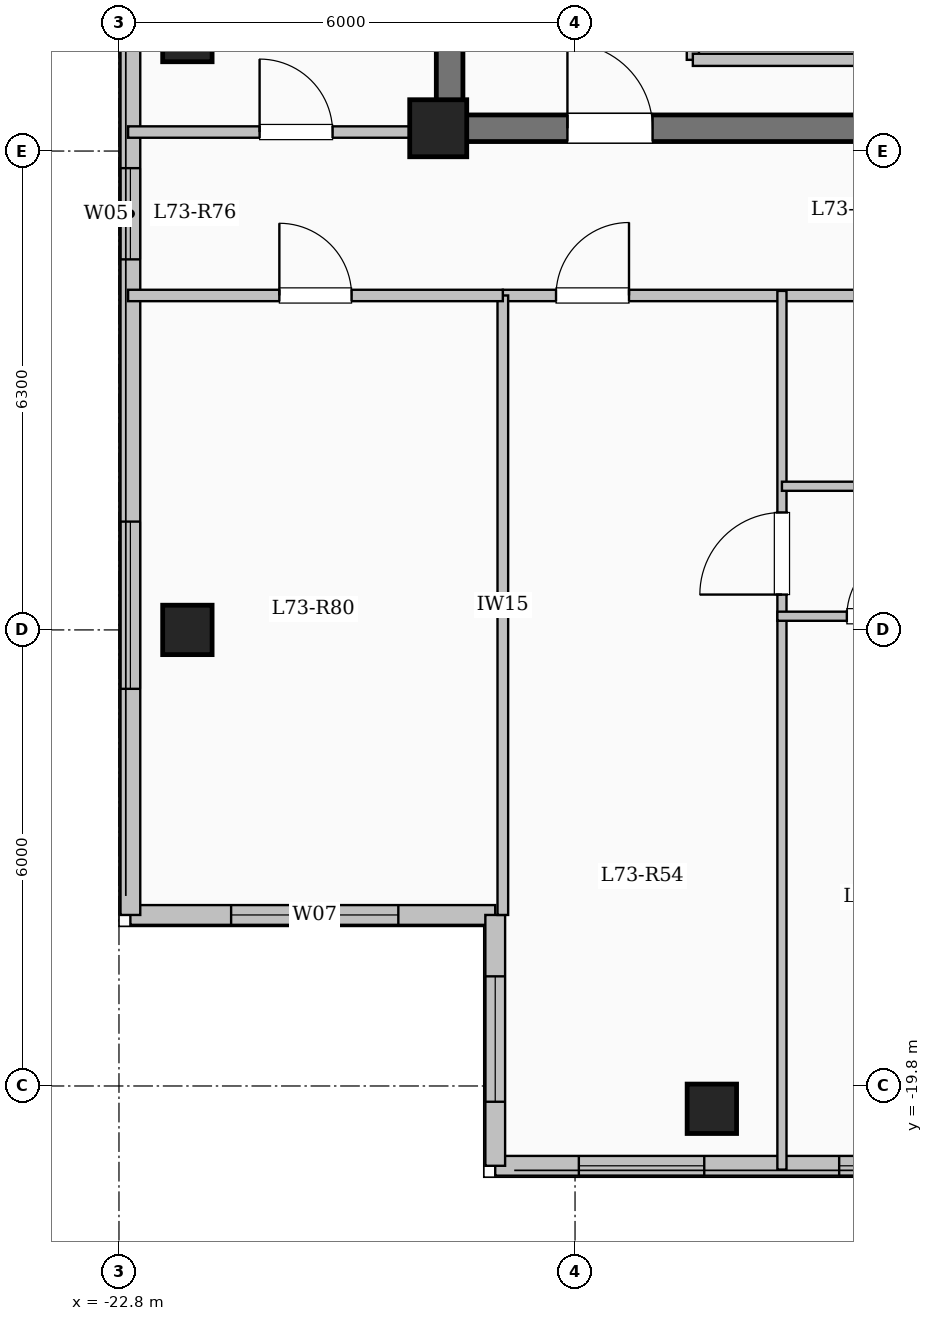
"""IFC4 building model, lengths in metres.
Left out: names, types, materials, properties, quantities, classifications, styles, units other than length and angle.
Written with IfcOpenShell. Run it as: python <this file> out.ifc"""

import sys

from ifc_helpers import new_model, si_unit, direction, frame, frame_2d, origin, origin_2d, place, context, subcontext, project, spatial, rectangle, extrude, element, fill, save


model = new_model("IFC4")
c1 = context("Model", 3, precision=1e-05, world=origin(), true_north=direction((0.0, 1.0)))
c2 = subcontext(c1, "Body", "Model", "MODEL_VIEW")
j1 = project(units=[si_unit("LENGTHUNIT", "METRE"), si_unit("PLANEANGLEUNIT", "RADIAN")], contexts=[c1])
p1 = place(None, origin())
s1 = spatial("IfcSite", under=j1, at=p1, CompositionType="ELEMENT")
p2 = place(p1, origin())
s2 = spatial("IfcBuilding", under=s1, at=p2, CompositionType="ELEMENT")
p3 = place(p2, frame((0.0, 0.0, 268.3)))
s3 = spatial("IfcBuildingStorey", under=s2, at=p3, CompositionType="ELEMENT", Elevation=268.3)
p4 = place(p3, frame((-18.6, -7.2, 0.0), z_axis=(0.0, 0.0, 1.0), x_axis=(1.0, 0.0, 0.0)))
e1 = element("IfcColumn", 1, at=p4, inside=s3, PredefinedType="COLUMN", context=c2, shape_type="SweptSolid", body=[
    extrude(rectangle(XDim=0.75, YDim=0.75, at=origin_2d()), origin(), (0.0, 0.0, 1.0), 3.35),
])
for number, where, z_axis, x_axis in (
    (2, (-15.0, -20.1, 0.0), (0.0, 0.0, 1.0), (1.0, 0.0, 0.0)),
    (3, (-21.9, -13.8, 0.0), (0.0, 0.0, 1.0), (1.0, 0.0, 0.0)),
    (4, (-21.9, -6.0, 0.0), (0.0, 0.0, 1.0), (1.0, 0.0, 0.0)),
):
    element("IfcColumn", number, at=place(p3, frame(where, z_axis=z_axis, x_axis=x_axis)), inside=s3, PredefinedType="COLUMN", context=c2, shape_type="SweptSolid", body=[
        extrude(rectangle(XDim=0.65, YDim=0.65, at=origin_2d()), origin(), (0.0, 0.0, 1.0), 3.35),
    ])
p5 = place(p3, frame((-17.85, -17.55, 0.0), z_axis=(0.0, 0.0, 1.0), x_axis=(-1.0, 0.0, 0.0)))
e5 = element("IfcWall", 5, at=p5, inside=s3, PredefinedType="SOLIDWALL", context=c2, shape_type="SweptSolid", body=[
    extrude(rectangle(XDim=4.8, YDim=0.26, at=frame_2d((2.4, 0.0))), origin(), (0.0, 0.0, 1.0), 3.05),
])
p6 = place(p5, frame((1.275, 0.0, 0.9)))
e6 = element("IfcOpeningElement", 6, at=p6, cuts=e5, PredefinedType="OPENING", context=c2, shape_type="SweptSolid", body=[
    extrude(rectangle(XDim=2.2, YDim=1.75, at=frame_2d((1.1, 0.875))), frame((0.0, 0.14, 0.0), z_axis=(0.0, -1.0, 0.0), x_axis=(1.0, 0.0, 0.0)), (0.0, 0.0, 1.0), 0.28),
])
p7 = place(p3, frame((-22.65, -17.55, 0.0), z_axis=(0.0, 0.0, 1.0), x_axis=(0.0, 1.0, 0.0)))
e7 = element("IfcWall", 7, at=p7, inside=s3, PredefinedType="SOLIDWALL", context=c2, shape_type="SweptSolid", body=[
    extrude(rectangle(XDim=35.1, YDim=0.26, at=frame_2d((17.55, 0.0))), origin(), (0.0, 0.0, 1.0), 3.05),
])
p8 = place(p7, frame((2.975, 0.0, 0.9)))
e8 = element("IfcOpeningElement", 8, at=p8, cuts=e7, PredefinedType="OPENING", context=c2, shape_type="SweptSolid", body=[
    extrude(rectangle(XDim=2.2, YDim=1.75, at=frame_2d((1.1, 0.875))), frame((0.0, 0.14, 0.0), z_axis=(0.0, -1.0, 0.0), x_axis=(1.0, 0.0, 0.0)), (0.0, 0.0, 1.0), 0.28),
])
p9 = place(p7, frame((8.625, 0.0, 0.95)))
e9 = element("IfcOpeningElement", 9, at=p9, cuts=e7, PredefinedType="OPENING", context=c2, shape_type="SweptSolid", body=[
    extrude(rectangle(XDim=1.2, YDim=1.5, at=frame_2d((0.6, 0.75))), frame((0.0, 0.14, 0.0), z_axis=(0.0, -1.0, 0.0), x_axis=(1.0, 0.0, 0.0)), (0.0, 0.0, 1.0), 0.28),
])
p10 = place(p7, frame((13.55, 0.0, 0.9)))
e10 = element("IfcOpeningElement", 10, at=p10, cuts=e7, PredefinedType="OPENING", context=c2, shape_type="SweptSolid", body=[
    extrude(rectangle(XDim=2.2, YDim=1.75, at=frame_2d((1.1, 0.875))), frame((0.0, 0.14, 0.0), z_axis=(0.0, -1.0, 0.0), x_axis=(1.0, 0.0, 0.0)), (0.0, 0.0, 1.0), 0.28),
])
p11 = place(p7, frame((19.95, 0.0, 0.9)))
e11 = element("IfcOpeningElement", 11, at=p11, cuts=e7, PredefinedType="OPENING", context=c2, shape_type="SweptSolid", body=[
    extrude(rectangle(XDim=1.65, YDim=1.6, at=frame_2d((0.825, 0.8))), frame((0.0, 0.14, 0.0), z_axis=(0.0, -1.0, 0.0), x_axis=(1.0, 0.0, 0.0)), (0.0, 0.0, 1.0), 0.28),
])
p12 = place(p7, frame((24.425, 0.0, 0.9)))
e12 = element("IfcOpeningElement", 12, at=p12, cuts=e7, PredefinedType="OPENING", context=c2, shape_type="SweptSolid", body=[
    extrude(rectangle(XDim=2.0, YDim=1.7, at=frame_2d((1.0, 0.85))), frame((0.0, 0.14, 0.0), z_axis=(0.0, -1.0, 0.0), x_axis=(1.0, 0.0, 0.0)), (0.0, 0.0, 1.0), 0.28),
])
p13 = place(p7, frame((28.675, 0.0, 0.95)))
e13 = element("IfcOpeningElement", 13, at=p13, cuts=e7, PredefinedType="OPENING", context=c2, shape_type="SweptSolid", body=[
    extrude(rectangle(XDim=1.0, YDim=1.5, at=frame_2d((0.5, 0.75))), frame((0.0, 0.14, 0.0), z_axis=(0.0, -1.0, 0.0), x_axis=(1.0, 0.0, 0.0)), (0.0, 0.0, 1.0), 0.28),
])
p14 = place(p7, frame((31.6, 0.0, 0.9)))
e14 = element("IfcOpeningElement", 14, at=p14, cuts=e7, PredefinedType="OPENING", context=c2, shape_type="SweptSolid", body=[
    extrude(rectangle(XDim=2.0, YDim=1.7, at=frame_2d((1.0, 0.85))), frame((0.0, 0.14, 0.0), z_axis=(0.0, -1.0, 0.0), x_axis=(1.0, 0.0, 0.0)), (0.0, 0.0, 1.0), 0.28),
])
p15 = place(p3, frame((-7.35, -20.85, 0.0), z_axis=(0.0, 0.0, 1.0), x_axis=(-1.0, 0.0, 0.0)))
e15 = element("IfcWall", 15, at=p15, inside=s3, PredefinedType="SOLIDWALL", context=c2, shape_type="SweptSolid", body=[
    extrude(rectangle(XDim=10.5, YDim=0.26, at=frame_2d((5.25, 0.0))), origin(), (0.0, 0.0, 1.0), 3.05),
])
p16 = place(p15, frame((0.145, 0.0, 0.95)))
e16 = element("IfcOpeningElement", 16, at=p16, cuts=e15, PredefinedType="OPENING", context=c2, shape_type="SweptSolid", body=[
    extrude(rectangle(XDim=0.85, YDim=1.5, at=frame_2d((0.425, 0.75))), frame((0.0, 0.14, 0.0), z_axis=(0.0, -1.0, 0.0), x_axis=(1.0, 0.0, 0.0)), (0.0, 0.0, 1.0), 0.28),
])
p17 = place(p15, frame((2.025, 0.0, 0.95)))
e17 = element("IfcOpeningElement", 17, at=p17, cuts=e15, PredefinedType="OPENING", context=c2, shape_type="SweptSolid", body=[
    extrude(rectangle(XDim=1.2, YDim=1.5, at=frame_2d((0.6, 0.75))), frame((0.0, 0.14, 0.0), z_axis=(0.0, -1.0, 0.0), x_axis=(1.0, 0.0, 0.0)), (0.0, 0.0, 1.0), 0.28),
])
p18 = place(p15, frame((4.775, 0.0, 0.95)))
e18 = element("IfcOpeningElement", 18, at=p18, cuts=e15, PredefinedType="OPENING", context=c2, shape_type="SweptSolid", body=[
    extrude(rectangle(XDim=1.2, YDim=1.5, at=frame_2d((0.6, 0.75))), frame((0.0, 0.14, 0.0), z_axis=(0.0, -1.0, 0.0), x_axis=(1.0, 0.0, 0.0)), (0.0, 0.0, 1.0), 0.28),
])
p19 = place(p15, frame((7.75, 0.0, 0.9)))
e19 = element("IfcOpeningElement", 19, at=p19, cuts=e15, PredefinedType="OPENING", context=c2, shape_type="SweptSolid", body=[
    extrude(rectangle(XDim=1.65, YDim=1.6, at=frame_2d((0.825, 0.8))), frame((0.0, 0.14, 0.0), z_axis=(0.0, -1.0, 0.0), x_axis=(1.0, 0.0, 0.0)), (0.0, 0.0, 1.0), 0.28),
])
p20 = place(p3, frame((-17.85, -20.85, 0.0), z_axis=(0.0, 0.0, 1.0), x_axis=(0.0, 1.0, 0.0)))
e20 = element("IfcWall", 20, at=p20, inside=s3, PredefinedType="SOLIDWALL", context=c2, shape_type="SweptSolid", body=[
    extrude(rectangle(XDim=3.3, YDim=0.26, at=frame_2d((1.65, 0.0))), origin(), (0.0, 0.0, 1.0), 3.05),
])
p21 = place(p20, frame((0.843, 0.0, 0.9)))
e21 = element("IfcOpeningElement", 21, at=p21, cuts=e20, PredefinedType="OPENING", context=c2, shape_type="SweptSolid", body=[
    extrude(rectangle(XDim=1.65, YDim=1.6, at=frame_2d((0.825, 0.8))), frame((0.0, 0.14, 0.0), z_axis=(0.0, -1.0, 0.0), x_axis=(1.0, 0.0, 0.0)), (0.0, 0.0, 1.0), 0.28),
])
p22 = place(p3, frame((-15.25, -6.3, 0.0), z_axis=(0.0, 0.0, 1.0), x_axis=(0.0, 1.0, 0.0)))
e22 = element("IfcWall", 22, at=p22, inside=s3, PredefinedType="SOLIDWALL", context=c2, shape_type="SweptSolid", body=[
    extrude(rectangle(XDim=2.6, YDim=0.16, at=frame_2d((1.3, 0.0))), origin(), (0.0, 0.0, 1.0), 3.05),
])
p23 = place(p22, frame((0.75, 0.0, 0.0)))
e23 = element("IfcOpeningElement", 23, at=p23, cuts=e22, PredefinedType="OPENING", context=c2, shape_type="SweptSolid", body=[
    extrude(rectangle(XDim=1.1, YDim=2.15, at=frame_2d((0.55, 1.075))), frame((0.0, 0.09, 0.0), z_axis=(0.0, -1.0, 0.0), x_axis=(1.0, 0.0, 0.0)), (0.0, 0.0, 1.0), 0.18),
])
p24 = place(p3, frame((-15.25, -6.3, 0.0), z_axis=(0.0, 0.0, 1.0), x_axis=(1.0, 0.0, 0.0)))
e24 = element("IfcWall", 24, at=p24, inside=s3, PredefinedType="SOLIDWALL", context=c2, shape_type="SweptSolid", body=[
    extrude(rectangle(XDim=2.3, YDim=0.16, at=frame_2d((1.15, 0.0))), origin(), (0.0, 0.0, 1.0), 3.05),
])
p25 = place(p3, frame((-18.45, -7.375, 0.0), z_axis=(0.0, 0.0, 1.0), x_axis=(0.0, 1.0, 0.0)))
e25 = element("IfcWall", 25, at=p25, inside=s3, PredefinedType="SHEAR", context=c2, shape_type="SweptSolid", body=[
    extrude(rectangle(XDim=14.05, YDim=0.35, at=frame_2d((7.025, 0.0))), origin(), (0.0, 0.0, 1.0), 3.35),
])
p26 = place(p3, frame((-18.625, -7.2, 0.0), z_axis=(0.0, 0.0, 1.0), x_axis=(1.0, 0.0, 0.0)))
e26 = element("IfcWall", 26, at=p26, inside=s3, PredefinedType="SHEAR", context=c2, shape_type="SweptSolid", body=[
    extrude(rectangle(XDim=8.55, YDim=0.35, at=frame_2d((4.275, 0.0))), origin(), (0.0, 0.0, 1.0), 3.35),
])
p27 = place(p26, frame((1.725, 0.0, 0.0)))
e27 = element("IfcOpeningElement", 27, at=p27, cuts=e26, PredefinedType="OPENING", context=c2, shape_type="SweptSolid", body=[
    extrude(rectangle(XDim=1.12, YDim=2.15, at=frame_2d((0.56, 1.075))), frame((0.0, 0.185, 0.0), z_axis=(0.0, -1.0, 0.0), x_axis=(1.0, 0.0, 0.0)), (0.0, 0.0, 1.0), 0.37),
])
p28 = place(p3, frame((-17.75, -9.4, 0.0), z_axis=(0.0, 0.0, 1.0), x_axis=(1.0, 0.0, 0.0)))
e28 = element("IfcWall", 28, at=p28, inside=s3, PredefinedType="PARTITIONING", context=c2, shape_type="SweptSolid", body=[
    extrude(rectangle(XDim=9.2, YDim=0.15, at=frame_2d((4.6, 0.0))), origin(), (0.0, 0.0, 1.0), 3.05),
])
p29 = place(p28, frame((0.7, 0.0, 0.0)))
e29 = element("IfcOpeningElement", 29, at=p29, cuts=e28, PredefinedType="OPENING", context=c2, shape_type="SweptSolid", body=[
    extrude(rectangle(XDim=0.96, YDim=2.15, at=frame_2d((0.48, 1.075))), frame((0.0, 0.085, 0.0), z_axis=(0.0, -1.0, 0.0), x_axis=(1.0, 0.0, 0.0)), (0.0, 0.0, 1.0), 0.17),
])
p30 = place(p3, frame((-14.078, -20.9, 0.0), z_axis=(0.0, 0.0, 1.0), x_axis=(0.0, 1.0, 0.0)))
e30 = element("IfcWall", 30, at=p30, inside=s3, PredefinedType="PARTITIONING", context=c2, shape_type="SweptSolid", body=[
    extrude(rectangle(XDim=11.56, YDim=0.12, at=frame_2d((5.78, 0.0))), origin(), (0.0, 0.0, 1.0), 3.05),
])
p31 = place(p30, frame((7.565, 0.0, 0.0)))
e31 = element("IfcOpeningElement", 31, at=p31, cuts=e30, PredefinedType="OPENING", context=c2, shape_type="SweptSolid", body=[
    extrude(rectangle(XDim=1.08, YDim=2.15, at=frame_2d((0.54, 1.075))), frame((0.0, 0.07, 0.0), z_axis=(0.0, -1.0, 0.0), x_axis=(1.0, 0.0, 0.0)), (0.0, 0.0, 1.0), 0.14),
])
p32 = place(p3, frame((-14.078, -11.91, 0.0), z_axis=(0.0, 0.0, 1.0), x_axis=(1.0, 0.0, 0.0)))
e32 = element("IfcWall", 32, at=p32, inside=s3, PredefinedType="PARTITIONING", context=c2, shape_type="SweptSolid", body=[
    extrude(rectangle(XDim=3.088, YDim=0.12, at=frame_2d((1.544, 0.0))), origin(), (0.0, 0.0, 1.0), 3.05),
])
p33 = place(p32, frame((1.104, 0.0, 0.0)))
e33 = element("IfcOpeningElement", 33, at=p33, cuts=e32, PredefinedType="OPENING", context=c2, shape_type="SweptSolid", body=[
    extrude(rectangle(XDim=0.88, YDim=2.1, at=frame_2d((0.44, 1.05))), frame((0.0, 0.07, 0.0), z_axis=(0.0, -1.0, 0.0), x_axis=(1.0, 0.0, 0.0)), (0.0, 0.0, 1.0), 0.14),
])
p34 = place(p3, frame((-14.138, -13.62, 0.0), z_axis=(0.0, 0.0, 1.0), x_axis=(1.0, 0.0, 0.0)))
e34 = element("IfcWall", 34, at=p34, inside=s3, PredefinedType="PARTITIONING", context=c2, shape_type="SweptSolid", body=[
    extrude(rectangle(XDim=5.598, YDim=0.12, at=frame_2d((2.799, 0.0))), origin(), (0.0, 0.0, 1.0), 3.05),
])
p35 = place(p34, frame((0.914, 0.0, 0.0)))
e35 = element("IfcOpeningElement", 35, at=p35, cuts=e34, PredefinedType="OPENING", context=c2, shape_type="SweptSolid", body=[
    extrude(rectangle(XDim=0.88, YDim=2.1, at=frame_2d((0.44, 1.05))), frame((0.0, 0.07, 0.0), z_axis=(0.0, -1.0, 0.0), x_axis=(1.0, 0.0, 0.0)), (0.0, 0.0, 1.0), 0.14),
])
p36 = place(p34, frame((3.623, 0.0, 0.0)))
e36 = element("IfcOpeningElement", 36, at=p36, cuts=e34, PredefinedType="OPENING", context=c2, shape_type="SweptSolid", body=[
    extrude(rectangle(XDim=0.88, YDim=2.1, at=frame_2d((0.44, 1.05))), frame((0.0, 0.07, 0.0), z_axis=(0.0, -1.0, 0.0), x_axis=(1.0, 0.0, 0.0)), (0.0, 0.0, 1.0), 0.14),
])
p37 = place(p3, frame((-22.68, -7.25, 0.0), z_axis=(0.0, 0.0, 1.0), x_axis=(1.0, 0.0, 0.0)))
e37 = element("IfcWall", 37, at=p37, inside=s3, PredefinedType="PARTITIONING", context=c2, shape_type="SweptSolid", body=[
    extrude(rectangle(XDim=4.23, YDim=0.15, at=frame_2d((2.115, 0.0))), origin(), (0.0, 0.0, 1.0), 3.05),
])
p38 = place(p37, frame((1.73, 0.0, 0.0)))
e38 = element("IfcOpeningElement", 38, at=p38, cuts=e37, PredefinedType="OPENING", context=c2, shape_type="SweptSolid", body=[
    extrude(rectangle(XDim=0.96, YDim=2.15, at=frame_2d((0.48, 1.075))), frame((0.0, 0.085, 0.0), z_axis=(0.0, -1.0, 0.0), x_axis=(1.0, 0.0, 0.0)), (0.0, 0.0, 1.0), 0.17),
])
p39 = place(p3, frame((-17.75, -17.55, 0.0), z_axis=(0.0, 0.0, 1.0), x_axis=(0.0, 1.0, 0.0)))
e39 = element("IfcWall", 39, at=p39, inside=s3, PredefinedType="PARTITIONING", context=c2, shape_type="SweptSolid", body=[
    extrude(rectangle(XDim=8.15, YDim=0.14, at=frame_2d((4.075, 0.0))), origin(), (0.0, 0.0, 1.0), 3.05),
])
p40 = place(p3, frame((-22.68, -9.4, 0.0), z_axis=(0.0, 0.0, 1.0), x_axis=(1.0, 0.0, 0.0)))
e40 = element("IfcWall", 40, at=p40, inside=s3, PredefinedType="PARTITIONING", context=c2, shape_type="SweptSolid", body=[
    extrude(rectangle(XDim=4.93, YDim=0.15, at=frame_2d((2.465, 0.0))), origin(), (0.0, 0.0, 1.0), 3.05),
])
p41 = place(p40, frame((1.99, 0.0, 0.0)))
e41 = element("IfcOpeningElement", 41, at=p41, cuts=e40, PredefinedType="OPENING", context=c2, shape_type="SweptSolid", body=[
    extrude(rectangle(XDim=0.95, YDim=2.15, at=frame_2d((0.475, 1.075))), frame((0.0, 0.085, 0.0), z_axis=(0.0, -1.0, 0.0), x_axis=(1.0, 0.0, 0.0)), (0.0, 0.0, 1.0), 0.17),
])
p42 = place(p6, origin())
e42 = element("IfcWindow", 42, at=p42, inside=s3, PartitioningType="SINGLE_PANEL", PredefinedType="WINDOW", context=c2, shape_type="SweptSolid", body=[
    extrude(rectangle(XDim=2.2, YDim=1.75, at=frame_2d((1.1, 0.875))), frame((0.0, 0.03, 0.0), z_axis=(0.0, -1.0, 0.0), x_axis=(1.0, 0.0, 0.0)), (0.0, 0.0, 1.0), 0.06),
])
fill(e6, e42)
p43 = place(p8, origin())
e43 = element("IfcWindow", 43, at=p43, inside=s3, PartitioningType="SINGLE_PANEL", PredefinedType="WINDOW", context=c2, shape_type="SweptSolid", body=[
    extrude(rectangle(XDim=2.2, YDim=1.75, at=frame_2d((1.1, 0.875))), frame((0.0, 0.03, 0.0), z_axis=(0.0, -1.0, 0.0), x_axis=(1.0, 0.0, 0.0)), (0.0, 0.0, 1.0), 0.06),
])
fill(e8, e43)
p44 = place(p9, origin())
e44 = element("IfcWindow", 44, at=p44, inside=s3, PartitioningType="SINGLE_PANEL", PredefinedType="WINDOW", context=c2, shape_type="SweptSolid", body=[
    extrude(rectangle(XDim=1.2, YDim=1.5, at=frame_2d((0.6, 0.75))), frame((0.0, 0.03, 0.0), z_axis=(0.0, -1.0, 0.0), x_axis=(1.0, 0.0, 0.0)), (0.0, 0.0, 1.0), 0.06),
])
fill(e9, e44)
p45 = place(p18, origin())
e45 = element("IfcWindow", 45, at=p45, inside=s3, PartitioningType="SINGLE_PANEL", PredefinedType="WINDOW", context=c2, shape_type="SweptSolid", body=[
    extrude(rectangle(XDim=1.2, YDim=1.5, at=frame_2d((0.6, 0.75))), frame((0.0, 0.03, 0.0), z_axis=(0.0, -1.0, 0.0), x_axis=(1.0, 0.0, 0.0)), (0.0, 0.0, 1.0), 0.06),
])
fill(e18, e45)
p46 = place(p19, origin())
e46 = element("IfcWindow", 46, at=p46, inside=s3, PartitioningType="SINGLE_PANEL", PredefinedType="WINDOW", context=c2, shape_type="SweptSolid", body=[
    extrude(rectangle(XDim=1.65, YDim=1.6, at=frame_2d((0.825, 0.8))), frame((0.0, 0.03, 0.0), z_axis=(0.0, -1.0, 0.0), x_axis=(1.0, 0.0, 0.0)), (0.0, 0.0, 1.0), 0.06),
])
fill(e19, e46)
p47 = place(p21, origin())
e47 = element("IfcWindow", 47, at=p47, inside=s3, PartitioningType="SINGLE_PANEL", PredefinedType="WINDOW", context=c2, shape_type="SweptSolid", body=[
    extrude(rectangle(XDim=1.65, YDim=1.6, at=frame_2d((0.825, 0.8))), frame((0.0, 0.03, 0.0), z_axis=(0.0, -1.0, 0.0), x_axis=(1.0, 0.0, 0.0)), (0.0, 0.0, 1.0), 0.06),
])
fill(e21, e47)
p48 = place(p27, origin())
e48 = element("IfcDoor", 48, at=p48, inside=s3, OperationType="SINGLE_SWING_LEFT", PredefinedType="DOOR", context=c2, shape_type="SweptSolid", body=[
    extrude(rectangle(XDim=1.12, YDim=2.15, at=frame_2d((0.56, 1.075))), frame((0.0, 0.025, 0.0), z_axis=(0.0, -1.0, 0.0), x_axis=(1.0, 0.0, 0.0)), (0.0, 0.0, 1.0), 0.05),
])
fill(e27, e48)
p49 = place(p29, origin())
e49 = element("IfcDoor", 49, at=p49, inside=s3, OperationType="SINGLE_SWING_RIGHT", PredefinedType="DOOR", context=c2, shape_type="SweptSolid", body=[
    extrude(rectangle(XDim=0.96, YDim=2.15, at=frame_2d((0.48, 1.075))), frame((0.0, 0.025, 0.0), z_axis=(0.0, -1.0, 0.0), x_axis=(1.0, 0.0, 0.0)), (0.0, 0.0, 1.0), 0.05),
])
fill(e29, e49)
p50 = place(p31, origin())
e50 = element("IfcDoor", 50, at=p50, inside=s3, OperationType="SINGLE_SWING_LEFT", PredefinedType="DOOR", context=c2, shape_type="SweptSolid", body=[
    extrude(rectangle(XDim=1.08, YDim=2.15, at=frame_2d((0.54, 1.075))), frame((0.0, 0.025, 0.0), z_axis=(0.0, -1.0, 0.0), x_axis=(1.0, 0.0, 0.0)), (0.0, 0.0, 1.0), 0.05),
])
fill(e31, e50)
p51 = place(p35, origin())
e51 = element("IfcDoor", 51, at=p51, inside=s3, OperationType="SINGLE_SWING_RIGHT", PredefinedType="DOOR", context=c2, shape_type="SweptSolid", body=[
    extrude(rectangle(XDim=0.88, YDim=2.1, at=frame_2d((0.44, 1.05))), frame((0.0, 0.025, 0.0), z_axis=(0.0, -1.0, 0.0), x_axis=(1.0, 0.0, 0.0)), (0.0, 0.0, 1.0), 0.05),
])
fill(e35, e51)
p52 = place(p41, origin())
e52 = element("IfcDoor", 52, at=p52, inside=s3, OperationType="SINGLE_SWING_LEFT", PredefinedType="DOOR", context=c2, shape_type="SweptSolid", body=[
    extrude(rectangle(XDim=0.95, YDim=2.15, at=frame_2d((0.475, 1.075))), frame((0.0, 0.025, 0.0), z_axis=(0.0, -1.0, 0.0), x_axis=(1.0, 0.0, 0.0)), (0.0, 0.0, 1.0), 0.05),
])
fill(e41, e52)
p53 = place(p38, origin())
e53 = element("IfcDoor", 53, at=p53, inside=s3, OperationType="SINGLE_SWING_LEFT", PredefinedType="DOOR", context=c2, shape_type="SweptSolid", body=[
    extrude(rectangle(XDim=0.96, YDim=2.15, at=frame_2d((0.48, 1.075))), frame((0.0, 0.025, 0.0), z_axis=(0.0, -1.0, 0.0), x_axis=(1.0, 0.0, 0.0)), (0.0, 0.0, 1.0), 0.05),
])
fill(e38, e53)
save(model, sys.argv[1])
